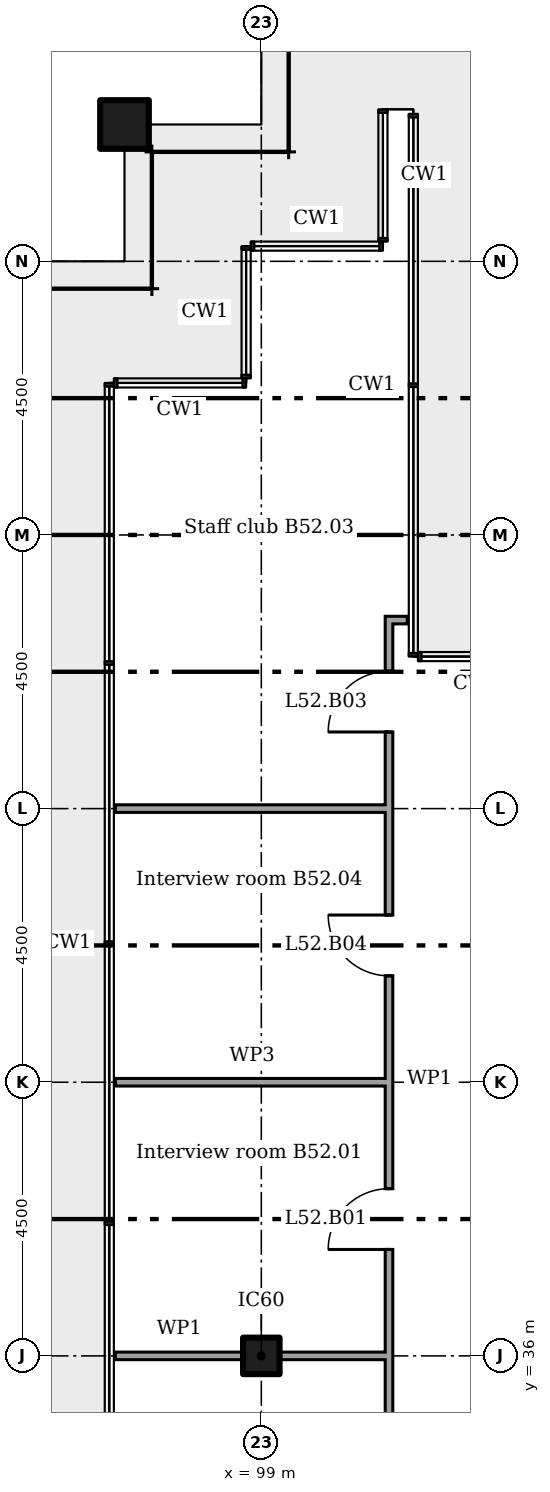
"""IFC4 building model, lengths in metres.
Left out: names, types, materials, properties, quantities, classifications, styles, units other than length and angle.
Written with IfcOpenShell. Run it as: python <this file> out.ifc"""

import sys

from ifc_helpers import new_model, si_unit, direction, frame, frame_2d, origin, origin_2d, place, context, subcontext, project, spatial, rectangle, extrude, element, fill, save


model = new_model("IFC4")
c1 = context("Model", 3, precision=1e-05, world=origin(), true_north=direction((0.0, 1.0)))
c2 = subcontext(c1, "Body", "Model", "MODEL_VIEW")
j1 = project(units=[si_unit("LENGTHUNIT", "METRE"), si_unit("PLANEANGLEUNIT", "RADIAN")], contexts=[c1])
p1 = place(None, origin())
s1 = spatial("IfcSite", under=j1, at=p1, CompositionType="ELEMENT")
p2 = place(p1, origin())
s2 = spatial("IfcBuilding", under=s1, at=p2, CompositionType="ELEMENT")
p3 = place(p2, frame((0.0, 0.0, 206.4)))
s3 = spatial("IfcBuildingStorey", under=s2, at=p3, CompositionType="ELEMENT", Elevation=206.4)
p4 = place(p3, frame((96.75, 56.25, 0.0)))
e1 = element("IfcColumn", 1, at=p4, inside=s3, PredefinedType="COLUMN", context=c2, shape_type="SweptSolid", body=[
    extrude(rectangle(XDim=0.8, YDim=0.8, at=origin_2d()), origin(), (0.0, 0.0, 1.0), 3.6),
])
p5 = place(p3, frame((99.0, 36.0, 0.0)))
e2 = element("IfcColumn", 2, at=p5, inside=s3, PredefinedType="COLUMN", context=c2, shape_type="SweptSolid", body=[
    extrude(rectangle(XDim=0.6, YDim=0.6, at=origin_2d()), origin(), (0.0, 0.0, 1.0), 3.6),
])
p6 = place(p3, frame((96.6, 36.0, 0.0)))
e3 = element("IfcWall", 3, at=p6, inside=s3, PredefinedType="PARTITIONING", context=c2, shape_type="SweptSolid", body=[
    extrude(rectangle(XDim=2.1, YDim=0.125, at=frame_2d((1.05, 0.0))), origin(), (0.0, 0.0, 1.0), 3.45),
])
p7 = place(p3, frame((99.3, 36.0, 0.0)))
e4 = element("IfcWall", 4, at=p7, inside=s3, PredefinedType="PARTITIONING", context=c2, shape_type="SweptSolid", body=[
    extrude(rectangle(XDim=1.8, YDim=0.125, at=frame_2d((0.9, 0.0))), origin(), (0.0, 0.0, 1.0), 3.45),
])
p8 = place(p3, frame((96.6, 40.5, 0.0)))
e5 = element("IfcWall", 5, at=p8, inside=s3, PredefinedType="MOVABLE", context=c2, shape_type="SweptSolid", body=[
    extrude(rectangle(XDim=4.5, YDim=0.125, at=frame_2d((2.25, 0.0))), origin(), (0.0, 0.0, 1.0), 2.851),
])
p9 = place(p3, frame((96.6, 45.0, 0.0)))
e6 = element("IfcWall", 6, at=p9, inside=s3, PredefinedType="PARTITIONING", context=c2, shape_type="SweptSolid", body=[
    extrude(rectangle(XDim=4.5, YDim=0.125, at=frame_2d((2.25, 0.0))), origin(), (0.0, 0.0, 1.0), 2.851),
])
p10 = place(p3, frame((101.038, 48.1, 0.0)))
e7 = element("IfcWall", 7, at=p10, inside=s3, PredefinedType="PARTITIONING", context=c2, shape_type="SweptSolid", body=[
    extrude(rectangle(XDim=0.362, YDim=0.125, at=frame_2d((0.181, 0.0))), origin(), (0.0, 0.0, 1.0), 3.45),
])
p11 = place(p3, frame((101.1, 33.062, 0.0), z_axis=(0.0, 0.0, 1.0), x_axis=(0.0, 1.0, 0.0)))
e8 = element("IfcWall", 8, at=p11, inside=s3, PredefinedType="PARTITIONING", context=c2, shape_type="SweptSolid", body=[
    extrude(rectangle(XDim=14.975, YDim=0.125, at=frame_2d((7.488, 0.0))), origin(), (0.0, 0.0, 1.0), 3.45),
])
p12 = place(p11, frame((4.688, 0.0, 0.0)))
e9 = element("IfcOpeningElement", 9, at=p12, cuts=e8, PredefinedType="OPENING", context=c2, shape_type="SweptSolid", body=[
    extrude(rectangle(XDim=1.0, YDim=2.1, at=frame_2d((0.5, 1.05))), frame((0.0, 0.073, 0.0), z_axis=(0.0, -1.0, 0.0), x_axis=(1.0, 0.0, 0.0)), (0.0, 0.0, 1.0), 0.145),
])
p13 = place(p11, frame((13.198, 0.0, 0.0)))
e10 = element("IfcOpeningElement", 10, at=p13, cuts=e8, PredefinedType="OPENING", context=c2, shape_type="SweptSolid", body=[
    extrude(rectangle(XDim=1.0, YDim=2.1, at=frame_2d((0.5, 1.05))), frame((0.0, 0.073, 0.0), z_axis=(0.0, -1.0, 0.0), x_axis=(1.0, 0.0, 0.0)), (0.0, 0.0, 1.0), 0.145),
])
p14 = place(p11, frame((9.188, 0.0, 0.0)))
e11 = element("IfcOpeningElement", 11, at=p14, cuts=e8, PredefinedType="OPENING", context=c2, shape_type="SweptSolid", body=[
    extrude(rectangle(XDim=1.0, YDim=2.1, at=frame_2d((0.5, 1.05))), frame((0.0, 0.073, 0.0), z_axis=(0.0, -1.0, 0.0), x_axis=(1.0, 0.0, 0.0)), (0.0, 0.0, 1.0), 0.145),
])
p15 = place(p12, origin())
e12 = element("IfcDoor", 12, at=p15, inside=s3, OperationType="SINGLE_SWING_RIGHT", PredefinedType="DOOR", context=c2, shape_type="SweptSolid", body=[
    extrude(rectangle(XDim=1.0, YDim=2.1, at=frame_2d((0.5, 1.05))), frame((0.0, 0.025, 0.0), z_axis=(0.0, -1.0, 0.0), x_axis=(1.0, 0.0, 0.0)), (0.0, 0.0, 1.0), 0.05),
])
fill(e9, e12)
p16 = place(p13, origin())
e13 = element("IfcDoor", 13, at=p16, inside=s3, OperationType="SINGLE_SWING_RIGHT", PredefinedType="DOOR", context=c2, shape_type="SweptSolid", body=[
    extrude(rectangle(XDim=1.0, YDim=2.1, at=frame_2d((0.5, 1.05))), frame((0.0, 0.025, 0.0), z_axis=(0.0, -1.0, 0.0), x_axis=(1.0, 0.0, 0.0)), (0.0, 0.0, 1.0), 0.05),
])
fill(e10, e13)
p17 = place(p14, origin())
e14 = element("IfcDoor", 14, at=p17, inside=s3, OperationType="SINGLE_SWING_LEFT", PredefinedType="DOOR", context=c2, shape_type="SweptSolid", body=[
    extrude(rectangle(XDim=1.0, YDim=2.1, at=frame_2d((0.5, 1.05))), frame((0.0, 0.025, 0.0), z_axis=(0.0, -1.0, 0.0), x_axis=(1.0, 0.0, 0.0)), (0.0, 0.0, 1.0), 0.05),
])
fill(e11, e14)
save(model, sys.argv[1])
